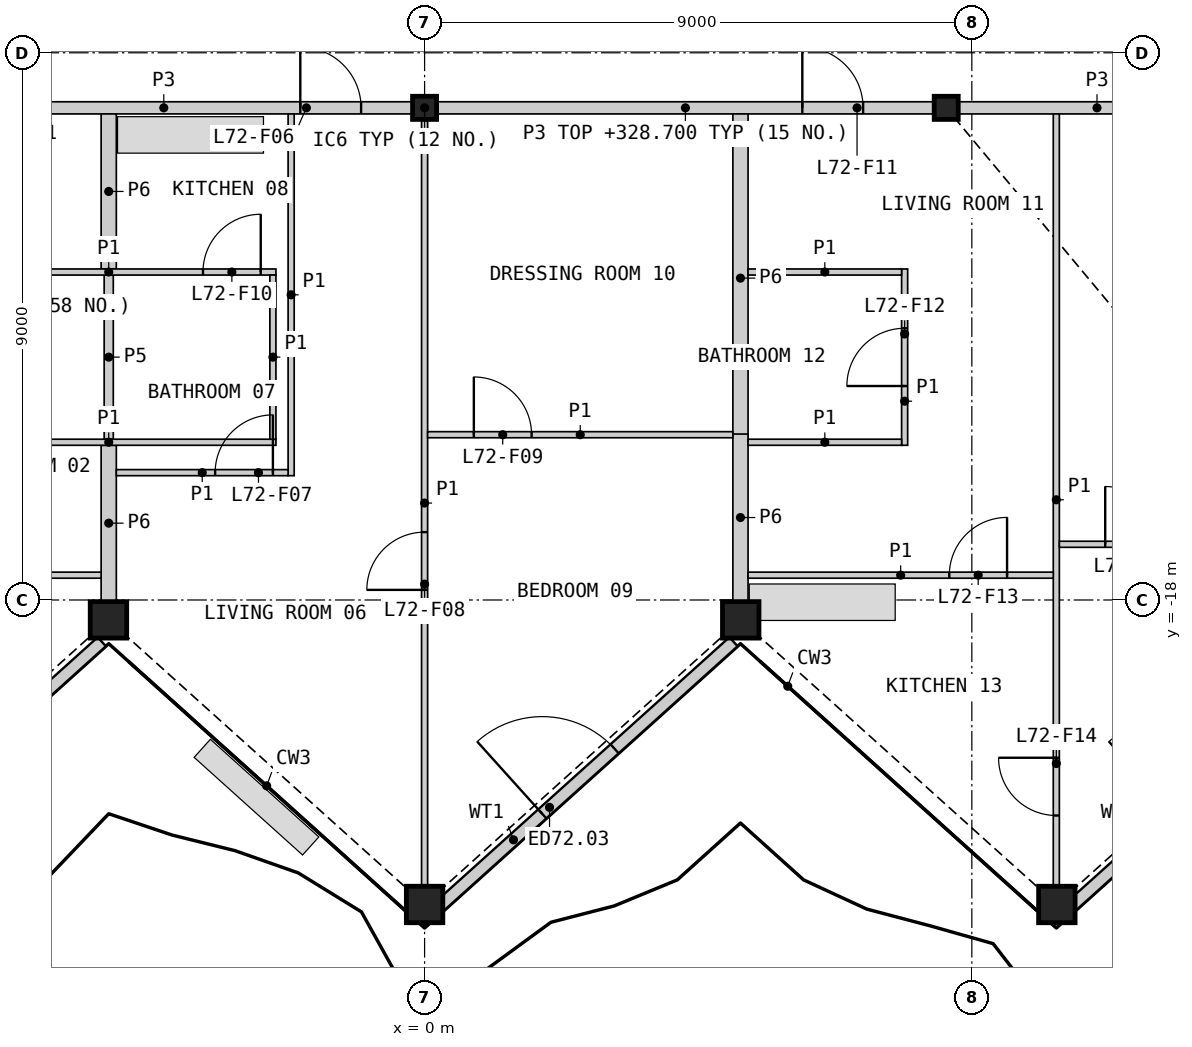
"""IFC4 building model, lengths in metres.
Left out: names, types, materials, properties, quantities, classifications, styles, units other than length and angle.
Written with IfcOpenShell. Run it as: python <this file> out.ifc"""

import sys

from ifc_helpers import new_model, si_unit, direction, frame, frame_2d, origin, origin_2d, place, context, subcontext, project, spatial, rectangle, hollow_rectangle, i_section, extrude, element, fill, save


model = new_model("IFC4")
c1 = context("Model", 3, precision=1e-05, world=origin(), true_north=direction((0.0, 1.0)))
c2 = subcontext(c1, "Body", "Model", "MODEL_VIEW")
j1 = project(units=[si_unit("LENGTHUNIT", "METRE"), si_unit("PLANEANGLEUNIT", "RADIAN")], contexts=[c1])
p1 = place(None, origin())
s1 = spatial("IfcSite", under=j1, at=p1, CompositionType="ELEMENT")
p2 = place(p1, origin())
s2 = spatial("IfcBuilding", under=s1, at=p2, CompositionType="ELEMENT")
p3 = place(p2, frame((0.0, 0.0, 325.6)))
s3 = spatial("IfcBuildingStorey", under=s2, at=p3, CompositionType="ELEMENT", Elevation=325.6)
for number, where, z_axis, x_axis in (
    (1, (-5.199, -18.327, 0.0), (0.0, 0.0, 1.0), (1.0, 0.0, 0.0)),
    (2, (0.0, -23.008, 0.0), (0.0, 0.0, 1.0), (1.0, 0.0, 0.0)),
    (3, (5.199, -18.327, 0.0), (0.0, 0.0, 1.0), (1.0, 0.0, 0.0)),
    (4, (10.398, -23.008, 0.0), (0.0, 0.0, 1.0), (1.0, 0.0, 0.0)),
):
    element("IfcColumn", number, at=place(p3, frame(where, z_axis=z_axis, x_axis=x_axis)), inside=s3, PredefinedType="COLUMN", context=c2, shape_type="SweptSolid", body=[
        extrude(hollow_rectangle(XDim=0.6, YDim=0.6, WallThickness=0.04, at=origin_2d()), origin(), (0.0, 0.0, 1.0), 3.4),
    ])
for number, where, z_axis, x_axis in (
    (5, (0.0, -9.906, 0.0), (0.0, 0.0, 1.0), (1.0, 0.0, 0.0)),
    (6, (8.578, -9.906, 0.0), (0.0, 0.0, 1.0), (1.0, 0.0, 0.0)),
):
    element("IfcColumn", number, at=place(p3, frame(where, z_axis=z_axis, x_axis=x_axis)), inside=s3, PredefinedType="COLUMN", context=c2, shape_type="SweptSolid", body=[
        extrude(i_section(OverallWidth=0.396, OverallDepth=0.381, WebThickness=0.019, FlangeThickness=0.03, at=origin_2d()), origin(), (0.0, 0.0, 1.0), 3.4),
    ])
p4 = place(p3, frame((-10.134, -23.031, 0.0), z_axis=(0.0, 0.0, 1.0), x_axis=(0.743138937876, 0.669137145145, 0.0)))
e7 = element("IfcWall", 7, at=p4, inside=s3, PredefinedType="SOLIDWALL", context=c2, shape_type="SweptSolid", body=[
    extrude(rectangle(XDim=6.493, YDim=0.2, at=frame_2d((3.246, 0.0))), origin(), (0.0, 0.0, 1.0), 2.488),
])
p5 = place(p4, frame((2.261, 0.0, 0.0)))
e8 = element("IfcOpeningElement", 8, at=p5, cuts=e7, PredefinedType="OPENING", context=c2, shape_type="SweptSolid", body=[
    extrude(rectangle(XDim=1.6, YDim=2.25, at=frame_2d((0.8, 1.125))), frame((0.0, 0.11, 0.0), z_axis=(0.0, -1.0, 0.0), x_axis=(1.0, 0.0, 0.0)), (0.0, 0.0, 1.0), 0.22),
])
p6 = place(p3, frame((0.256, -23.031, 0.0), z_axis=(0.0, 0.0, 1.0), x_axis=(0.743138937876, 0.669137145145, 0.0)))
e9 = element("IfcWall", 9, at=p6, inside=s3, PredefinedType="SOLIDWALL", context=c2, shape_type="SweptSolid", body=[
    extrude(rectangle(XDim=6.493, YDim=0.2, at=frame_2d((3.246, 0.0))), origin(), (0.0, 0.0, 1.0), 2.488),
])
p7 = place(p6, frame((2.261, 0.0, 0.0)))
e10 = element("IfcOpeningElement", 10, at=p7, cuts=e9, PredefinedType="OPENING", context=c2, shape_type="SweptSolid", body=[
    extrude(rectangle(XDim=1.6, YDim=2.25, at=frame_2d((0.8, 1.125))), frame((0.0, 0.11, 0.0), z_axis=(0.0, -1.0, 0.0), x_axis=(1.0, 0.0, 0.0)), (0.0, 0.0, 1.0), 0.22),
])
p8 = place(p3, frame((10.645, -23.031, 0.0), z_axis=(0.0, 0.0, 1.0), x_axis=(0.743138937876, 0.669137145145, 0.0)))
e11 = element("IfcWall", 11, at=p8, inside=s3, PredefinedType="SOLIDWALL", context=c2, shape_type="SweptSolid", body=[
    extrude(rectangle(XDim=6.493, YDim=0.2, at=frame_2d((3.246, 0.0))), origin(), (0.0, 0.0, 1.0), 2.488),
])
p9 = place(p8, frame((2.261, 0.0, 0.0)))
e12 = element("IfcOpeningElement", 12, at=p9, cuts=e11, PredefinedType="OPENING", context=c2, shape_type="SweptSolid", body=[
    extrude(rectangle(XDim=1.6, YDim=2.25, at=frame_2d((0.8, 1.125))), frame((0.0, 0.11, 0.0), z_axis=(0.0, -1.0, 0.0), x_axis=(1.0, 0.0, 0.0)), (0.0, 0.0, 1.0), 0.22),
])
p10 = place(p3, frame((0.208, -9.906, 0.0), z_axis=(0.0, 0.0, 1.0), x_axis=(1.0, 0.0, 0.0)))
e13 = element("IfcWall", 13, at=p10, inside=s3, PredefinedType="PARTITIONING", context=c2, shape_type="SweptSolid", body=[
    extrude(rectangle(XDim=8.163, YDim=0.2, at=frame_2d((4.082, 0.0))), origin(), (0.0, 0.0, 1.0), 3.1),
])
p11 = place(p10, frame((6.004, 0.0, 0.0)))
e14 = element("IfcOpeningElement", 14, at=p11, cuts=e13, PredefinedType="OPENING", context=c2, shape_type="SweptSolid", body=[
    extrude(rectangle(XDim=1.0, YDim=2.1, at=frame_2d((0.5, 1.05))), frame((0.0, 0.11, 0.0), z_axis=(0.0, -1.0, 0.0), x_axis=(1.0, 0.0, 0.0)), (0.0, 0.0, 1.0), 0.22),
])
p12 = place(p3, frame((-8.371, -9.906, 0.0), z_axis=(0.0, 0.0, 1.0), x_axis=(1.0, 0.0, 0.0)))
e15 = element("IfcWall", 15, at=p12, inside=s3, PredefinedType="PARTITIONING", context=c2, shape_type="SweptSolid", body=[
    extrude(rectangle(XDim=8.163, YDim=0.2, at=frame_2d((4.082, 0.0))), origin(), (0.0, 0.0, 1.0), 3.1),
])
p13 = place(p12, frame((1.159, 0.0, 0.0)))
e16 = element("IfcOpeningElement", 16, at=p13, cuts=e15, PredefinedType="OPENING", context=c2, shape_type="SweptSolid", body=[
    extrude(rectangle(XDim=1.0, YDim=2.1, at=frame_2d((0.5, 1.05))), frame((0.0, 0.11, 0.0), z_axis=(0.0, -1.0, 0.0), x_axis=(1.0, 0.0, 0.0)), (0.0, 0.0, 1.0), 0.22),
])
p14 = place(p12, frame((6.327, 0.0, 0.0)))
e17 = element("IfcOpeningElement", 17, at=p14, cuts=e15, PredefinedType="OPENING", context=c2, shape_type="SweptSolid", body=[
    extrude(rectangle(XDim=1.0, YDim=2.1, at=frame_2d((0.5, 1.05))), frame((0.0, 0.11, 0.0), z_axis=(0.0, -1.0, 0.0), x_axis=(1.0, 0.0, 0.0)), (0.0, 0.0, 1.0), 0.22),
])
p15 = place(p3, frame((5.195, -15.407, 0.0), z_axis=(0.0, 0.0, 1.0), x_axis=(0.0, 1.0, 0.0)))
e18 = element("IfcWall", 18, at=p15, inside=s3, PredefinedType="PARTITIONING", context=c2, shape_type="SweptSolid", body=[
    extrude(rectangle(XDim=5.401, YDim=0.25, at=frame_2d((2.701, 0.0))), origin(), (0.0, 0.0, 1.0), 2.33),
])
p16 = place(p3, frame((8.786, -9.906, 0.0), z_axis=(0.0, 0.0, 1.0), x_axis=(1.0, 0.0, 0.0)))
e19 = element("IfcWall", 19, at=p16, inside=s3, PredefinedType="PARTITIONING", context=c2, shape_type="SweptSolid", body=[
    extrude(rectangle(XDim=4.545, YDim=0.2, at=frame_2d((2.272, 0.0))), origin(), (0.0, 0.0, 1.0), 3.1),
])
p17 = place(p3, frame((-5.195, -12.556, 0.0), z_axis=(0.0, 0.0, 1.0), x_axis=(0.0, 1.0, 0.0)))
e20 = element("IfcWall", 20, at=p17, inside=s3, PredefinedType="PARTITIONING", context=c2, shape_type="SweptSolid", body=[
    extrude(rectangle(XDim=2.55, YDim=0.25, at=frame_2d((1.275, 0.0))), origin(), (0.0, 0.0, 1.0), 2.33),
])
p18 = place(p3, frame((5.195, -18.017, 0.0), z_axis=(0.0, 0.0, 1.0), x_axis=(0.0, 1.0, 0.0)))
e21 = element("IfcWall", 21, at=p18, inside=s3, PredefinedType="PARTITIONING", context=c2, shape_type="SweptSolid", body=[
    extrude(rectangle(XDim=2.746, YDim=0.25, at=frame_2d((1.373, 0.0))), origin(), (0.0, 0.0, 1.0), 2.33),
])
p19 = place(p3, frame((-5.195, -18.017, 0.0), z_axis=(0.0, 0.0, 1.0), x_axis=(0.0, 1.0, 0.0)))
e22 = element("IfcWall", 22, at=p19, inside=s3, PredefinedType="PARTITIONING", context=c2, shape_type="SweptSolid", body=[
    extrude(rectangle(XDim=2.561, YDim=0.25, at=frame_2d((1.281, 0.0))), origin(), (0.0, 0.0, 1.0), 2.33),
])
p20 = place(p3, frame((-5.195, -15.356, 0.0), z_axis=(0.0, 0.0, 1.0), x_axis=(0.0, 1.0, 0.0)))
e23 = element("IfcWall", 23, at=p20, inside=s3, PredefinedType="PLUMBINGWALL", context=c2, shape_type="SweptSolid", body=[
    extrude(rectangle(XDim=2.7, YDim=0.15, at=frame_2d((1.35, 0.0))), origin(), (0.0, 0.0, 1.0), 2.33),
])
p21 = place(p3, frame((10.389, -22.698, 0.0), z_axis=(0.0, 0.0, 1.0), x_axis=(0.0, 1.0, 0.0)))
e24 = element("IfcWall", 24, at=p21, inside=s3, PredefinedType="PARTITIONING", context=c2, shape_type="SweptSolid", body=[
    extrude(rectangle(XDim=12.692, YDim=0.1, at=frame_2d((6.346, 0.0))), origin(), (0.0, 0.0, 1.0), 2.33),
])
p22 = place(p21, frame((1.153, 0.0, 0.0)))
e25 = element("IfcOpeningElement", 25, at=p22, cuts=e24, PredefinedType="OPENING", context=c2, shape_type="SweptSolid", body=[
    extrude(rectangle(XDim=0.95, YDim=2.1, at=frame_2d((0.475, 1.05))), frame((0.0, 0.06, 0.0), z_axis=(0.0, -1.0, 0.0), x_axis=(1.0, 0.0, 0.0)), (0.0, 0.0, 1.0), 0.12),
])
p23 = place(p3, frame((0.0, -22.698, 0.0), z_axis=(0.0, 0.0, 1.0), x_axis=(0.0, 1.0, 0.0)))
e26 = element("IfcWall", 26, at=p23, inside=s3, PredefinedType="PARTITIONING", context=c2, shape_type="SweptSolid", body=[
    extrude(rectangle(XDim=12.585, YDim=0.1, at=frame_2d((6.292, 0.0))), origin(), (0.0, 0.0, 1.0), 2.33),
])
p24 = place(p23, frame((4.865, 0.0, 0.0)))
e27 = element("IfcOpeningElement", 27, at=p24, cuts=e26, PredefinedType="OPENING", context=c2, shape_type="SweptSolid", body=[
    extrude(rectangle(XDim=0.95, YDim=2.1, at=frame_2d((0.475, 1.05))), frame((0.0, 0.06, 0.0), z_axis=(0.0, -1.0, 0.0), x_axis=(1.0, 0.0, 0.0)), (0.0, 0.0, 1.0), 0.12),
])
p25 = place(p3, frame((10.439, -17.084, 0.0), z_axis=(0.0, 0.0, 1.0), x_axis=(1.0, 0.0, 0.0)))
e28 = element("IfcWall", 28, at=p25, inside=s3, PredefinedType="PARTITIONING", context=c2, shape_type="SweptSolid", body=[
    extrude(rectangle(XDim=6.693, YDim=0.1, at=frame_2d((3.346, 0.0))), origin(), (0.0, 0.0, 1.0), 2.33),
])
p26 = place(p25, frame((0.754, 0.0, 0.0)))
e29 = element("IfcOpeningElement", 29, at=p26, cuts=e28, PredefinedType="OPENING", context=c2, shape_type="SweptSolid", body=[
    extrude(rectangle(XDim=0.95, YDim=2.1, at=frame_2d((0.475, 1.05))), frame((0.0, 0.06, 0.0), z_axis=(0.0, -1.0, 0.0), x_axis=(1.0, 0.0, 0.0)), (0.0, 0.0, 1.0), 0.12),
])
p27 = place(p3, frame((-2.195, -15.956, 0.0), z_axis=(0.0, 0.0, 1.0), x_axis=(0.0, 1.0, 0.0)))
e30 = element("IfcWall", 30, at=p27, inside=s3, PredefinedType="PARTITIONING", context=c2, shape_type="SweptSolid", body=[
    extrude(rectangle(XDim=5.95, YDim=0.1, at=frame_2d((2.975, 0.0))), origin(), (0.0, 0.0, 1.0), 2.33),
])
p28 = place(p3, frame((-7.945, -12.606, 0.0), z_axis=(0.0, 0.0, 1.0), x_axis=(1.0, 0.0, 0.0)))
e31 = element("IfcWall", 31, at=p28, inside=s3, PredefinedType="PARTITIONING", context=c2, shape_type="SweptSolid", body=[
    extrude(rectangle(XDim=5.5, YDim=0.1, at=frame_2d((2.75, 0.0))), origin(), (0.0, 0.0, 1.0), 2.33),
])
p29 = place(p28, frame((4.3, 0.0, 0.0)))
e32 = element("IfcOpeningElement", 32, at=p29, cuts=e31, PredefinedType="OPENING", context=c2, shape_type="SweptSolid", body=[
    extrude(rectangle(XDim=0.95, YDim=2.1, at=frame_2d((0.475, 1.05))), frame((0.0, 0.06, 0.0), z_axis=(0.0, -1.0, 0.0), x_axis=(1.0, 0.0, 0.0)), (0.0, 0.0, 1.0), 0.12),
])
p30 = place(p3, frame((-7.945, -15.406, 0.0), z_axis=(0.0, 0.0, 1.0), x_axis=(1.0, 0.0, 0.0)))
e33 = element("IfcWall", 33, at=p30, inside=s3, PredefinedType="PARTITIONING", context=c2, shape_type="SweptSolid", body=[
    extrude(rectangle(XDim=5.5, YDim=0.1, at=frame_2d((2.75, 0.0))), origin(), (0.0, 0.0, 1.0), 2.33),
])
p31 = place(p3, frame((-10.339, -17.592, 0.0), z_axis=(0.0, 0.0, 1.0), x_axis=(1.0, 0.0, 0.0)))
e34 = element("IfcWall", 34, at=p31, inside=s3, PredefinedType="PARTITIONING", context=c2, shape_type="SweptSolid", body=[
    extrude(rectangle(XDim=5.02, YDim=0.1, at=frame_2d((2.51, 0.0))), origin(), (0.0, 0.0, 1.0), 2.33),
])
p32 = place(p31, frame((0.76, 0.0, 0.0)))
e35 = element("IfcOpeningElement", 35, at=p32, cuts=e34, PredefinedType="OPENING", context=c2, shape_type="SweptSolid", body=[
    extrude(rectangle(XDim=0.95, YDim=2.1, at=frame_2d((0.475, 1.05))), frame((0.0, 0.06, 0.0), z_axis=(0.0, -1.0, 0.0), x_axis=(1.0, 0.0, 0.0)), (0.0, 0.0, 1.0), 0.12),
])
p33 = place(p3, frame((5.32, -17.592, 0.0), z_axis=(0.0, 0.0, 1.0), x_axis=(1.0, 0.0, 0.0)))
e36 = element("IfcWall", 36, at=p33, inside=s3, PredefinedType="PARTITIONING", context=c2, shape_type="SweptSolid", body=[
    extrude(rectangle(XDim=5.02, YDim=0.1, at=frame_2d((2.51, 0.0))), origin(), (0.0, 0.0, 1.0), 2.33),
])
p34 = place(p33, frame((3.31, 0.0, 0.0)))
e37 = element("IfcOpeningElement", 37, at=p34, cuts=e36, PredefinedType="OPENING", context=c2, shape_type="SweptSolid", body=[
    extrude(rectangle(XDim=0.95, YDim=2.1, at=frame_2d((0.475, 1.05))), frame((0.0, 0.06, 0.0), z_axis=(0.0, -1.0, 0.0), x_axis=(1.0, 0.0, 0.0)), (0.0, 0.0, 1.0), 0.12),
])
p35 = place(p3, frame((0.05, -15.282, 0.0), z_axis=(0.0, 0.0, 1.0), x_axis=(1.0, 0.0, 0.0)))
e38 = element("IfcWall", 38, at=p35, inside=s3, PredefinedType="PARTITIONING", context=c2, shape_type="SweptSolid", body=[
    extrude(rectangle(XDim=5.02, YDim=0.1, at=frame_2d((2.51, 0.0))), origin(), (0.0, 0.0, 1.0), 2.33),
])
p36 = place(p35, frame((0.76, 0.0, 0.0)))
e39 = element("IfcOpeningElement", 39, at=p36, cuts=e38, PredefinedType="OPENING", context=c2, shape_type="SweptSolid", body=[
    extrude(rectangle(XDim=0.95, YDim=2.1, at=frame_2d((0.475, 1.05))), frame((0.0, 0.06, 0.0), z_axis=(0.0, -1.0, 0.0), x_axis=(1.0, 0.0, 0.0)), (0.0, 0.0, 1.0), 0.12),
])
p37 = place(p3, frame((-5.07, -15.906, 0.0), z_axis=(0.0, 0.0, 1.0), x_axis=(1.0, 0.0, 0.0)))
e40 = element("IfcWall", 40, at=p37, inside=s3, PredefinedType="PARTITIONING", context=c2, shape_type="SweptSolid", body=[
    extrude(rectangle(XDim=2.825, YDim=0.1, at=frame_2d((1.413, 0.0))), origin(), (0.0, 0.0, 1.0), 2.33),
])
p38 = place(p37, frame((1.625, 0.0, 0.0)))
e41 = element("IfcOpeningElement", 41, at=p38, cuts=e40, PredefinedType="OPENING", context=c2, shape_type="SweptSolid", body=[
    extrude(rectangle(XDim=0.95, YDim=2.1, at=frame_2d((0.475, 1.05))), frame((0.0, 0.06, 0.0), z_axis=(0.0, -1.0, 0.0), x_axis=(1.0, 0.0, 0.0)), (0.0, 0.0, 1.0), 0.12),
])
p39 = place(p3, frame((-2.495, -15.356, 0.0), z_axis=(0.0, 0.0, 1.0), x_axis=(0.0, 1.0, 0.0)))
e42 = element("IfcWall", 42, at=p39, inside=s3, PredefinedType="PARTITIONING", context=c2, shape_type="SweptSolid", body=[
    extrude(rectangle(XDim=2.7, YDim=0.1, at=frame_2d((1.35, 0.0))), origin(), (0.0, 0.0, 1.0), 2.33),
])
p40 = place(p3, frame((7.895, -15.456, 0.0), z_axis=(0.0, 0.0, 1.0), x_axis=(0.0, 1.0, 0.0)))
e43 = element("IfcWall", 43, at=p40, inside=s3, PredefinedType="PARTITIONING", context=c2, shape_type="SweptSolid", body=[
    extrude(rectangle(XDim=2.9, YDim=0.1, at=frame_2d((1.45, 0.0))), origin(), (0.0, 0.0, 1.0), 2.33),
])
p41 = place(p40, frame((0.975, 0.0, 0.0)))
e44 = element("IfcOpeningElement", 44, at=p41, cuts=e43, PredefinedType="OPENING", context=c2, shape_type="SweptSolid", body=[
    extrude(rectangle(XDim=0.95, YDim=2.1, at=frame_2d((0.475, 1.05))), frame((0.0, 0.06, 0.0), z_axis=(0.0, -1.0, 0.0), x_axis=(1.0, 0.0, 0.0)), (0.0, 0.0, 1.0), 0.12),
])
for number, where, z_axis, x_axis in (
    (45, (5.32, -12.606, 0.0), (0.0, 0.0, 1.0), (1.0, 0.0, 0.0)),
    (46, (5.32, -15.406, 0.0), (0.0, 0.0, 1.0), (1.0, 0.0, 0.0)),
):
    element("IfcWall", number, at=place(p3, frame(where, z_axis=z_axis, x_axis=x_axis)), inside=s3, PredefinedType="PARTITIONING", context=c2, shape_type="SweptSolid", body=[
        extrude(rectangle(XDim=2.525, YDim=0.1, at=frame_2d((1.263, 0.0))), origin(), (0.0, 0.0, 1.0), 2.33),
    ])
p42 = place(p7, origin())
e47 = element("IfcDoor", 47, at=p42, inside=s3, OperationType="DOUBLE_DOOR_SINGLE_SWING", PredefinedType="DOOR", context=c2, shape_type="SweptSolid", body=[
    extrude(rectangle(XDim=1.6, YDim=2.25, at=frame_2d((0.8, 1.125))), frame((0.0, 0.025, 0.0), z_axis=(0.0, -1.0, 0.0), x_axis=(1.0, 0.0, 0.0)), (0.0, 0.0, 1.0), 0.05),
])
fill(e10, e47)
p43 = place(p14, origin())
e48 = element("IfcDoor", 48, at=p43, inside=s3, OperationType="SINGLE_SWING_LEFT", PredefinedType="DOOR", context=c2, shape_type="SweptSolid", body=[
    extrude(rectangle(XDim=1.0, YDim=2.1, at=frame_2d((0.5, 1.05))), frame((0.0, 0.025, 0.0), z_axis=(0.0, -1.0, 0.0), x_axis=(1.0, 0.0, 0.0)), (0.0, 0.0, 1.0), 0.05),
])
fill(e17, e48)
p44 = place(p38, origin())
e49 = element("IfcDoor", 49, at=p44, inside=s3, OperationType="SINGLE_SWING_RIGHT", PredefinedType="DOOR", context=c2, shape_type="SweptSolid", body=[
    extrude(rectangle(XDim=0.95, YDim=2.1, at=frame_2d((0.475, 1.05))), frame((0.0, 0.025, 0.0), z_axis=(0.0, -1.0, 0.0), x_axis=(1.0, 0.0, 0.0)), (0.0, 0.0, 1.0), 0.05),
])
fill(e41, e49)
p45 = place(p24, origin())
e50 = element("IfcDoor", 50, at=p45, inside=s3, OperationType="SINGLE_SWING_LEFT", PredefinedType="DOOR", context=c2, shape_type="SweptSolid", body=[
    extrude(rectangle(XDim=0.95, YDim=2.1, at=frame_2d((0.475, 1.05))), frame((0.0, 0.025, 0.0), z_axis=(0.0, -1.0, 0.0), x_axis=(1.0, 0.0, 0.0)), (0.0, 0.0, 1.0), 0.05),
])
fill(e27, e50)
p46 = place(p36, origin())
e51 = element("IfcDoor", 51, at=p46, inside=s3, OperationType="SINGLE_SWING_LEFT", PredefinedType="DOOR", context=c2, shape_type="SweptSolid", body=[
    extrude(rectangle(XDim=0.95, YDim=2.1, at=frame_2d((0.475, 1.05))), frame((0.0, 0.025, 0.0), z_axis=(0.0, -1.0, 0.0), x_axis=(1.0, 0.0, 0.0)), (0.0, 0.0, 1.0), 0.05),
])
fill(e39, e51)
p47 = place(p29, origin())
e52 = element("IfcDoor", 52, at=p47, inside=s3, OperationType="SINGLE_SWING_RIGHT", PredefinedType="DOOR", context=c2, shape_type="SweptSolid", body=[
    extrude(rectangle(XDim=0.95, YDim=2.1, at=frame_2d((0.475, 1.05))), frame((0.0, 0.025, 0.0), z_axis=(0.0, -1.0, 0.0), x_axis=(1.0, 0.0, 0.0)), (0.0, 0.0, 1.0), 0.05),
])
fill(e32, e52)
p48 = place(p11, origin())
e53 = element("IfcDoor", 53, at=p48, inside=s3, OperationType="SINGLE_SWING_LEFT", PredefinedType="DOOR", context=c2, shape_type="SweptSolid", body=[
    extrude(rectangle(XDim=1.0, YDim=2.1, at=frame_2d((0.5, 1.05))), frame((0.0, 0.025, 0.0), z_axis=(0.0, -1.0, 0.0), x_axis=(1.0, 0.0, 0.0)), (0.0, 0.0, 1.0), 0.05),
])
fill(e14, e53)
p49 = place(p41, origin())
e54 = element("IfcDoor", 54, at=p49, inside=s3, OperationType="SINGLE_SWING_LEFT", PredefinedType="DOOR", context=c2, shape_type="SweptSolid", body=[
    extrude(rectangle(XDim=0.95, YDim=2.1, at=frame_2d((0.475, 1.05))), frame((0.0, 0.025, 0.0), z_axis=(0.0, -1.0, 0.0), x_axis=(1.0, 0.0, 0.0)), (0.0, 0.0, 1.0), 0.05),
])
fill(e44, e54)
p50 = place(p34, origin())
e55 = element("IfcDoor", 55, at=p50, inside=s3, OperationType="SINGLE_SWING_RIGHT", PredefinedType="DOOR", context=c2, shape_type="SweptSolid", body=[
    extrude(rectangle(XDim=0.95, YDim=2.1, at=frame_2d((0.475, 1.05))), frame((0.0, 0.025, 0.0), z_axis=(0.0, -1.0, 0.0), x_axis=(1.0, 0.0, 0.0)), (0.0, 0.0, 1.0), 0.05),
])
fill(e37, e55)
p51 = place(p22, origin())
e56 = element("IfcDoor", 56, at=p51, inside=s3, OperationType="SINGLE_SWING_RIGHT", PredefinedType="DOOR", context=c2, shape_type="SweptSolid", body=[
    extrude(rectangle(XDim=0.95, YDim=2.1, at=frame_2d((0.475, 1.05))), frame((0.0, 0.025, 0.0), z_axis=(0.0, -1.0, 0.0), x_axis=(1.0, 0.0, 0.0)), (0.0, 0.0, 1.0), 0.05),
])
fill(e25, e56)
p52 = place(p26, origin())
e57 = element("IfcDoor", 57, at=p52, inside=s3, OperationType="SINGLE_SWING_LEFT", PredefinedType="DOOR", context=c2, shape_type="SweptSolid", body=[
    extrude(rectangle(XDim=0.95, YDim=2.1, at=frame_2d((0.475, 1.05))), frame((0.0, 0.025, 0.0), z_axis=(0.0, -1.0, 0.0), x_axis=(1.0, 0.0, 0.0)), (0.0, 0.0, 1.0), 0.05),
])
fill(e29, e57)
save(model, sys.argv[1])
